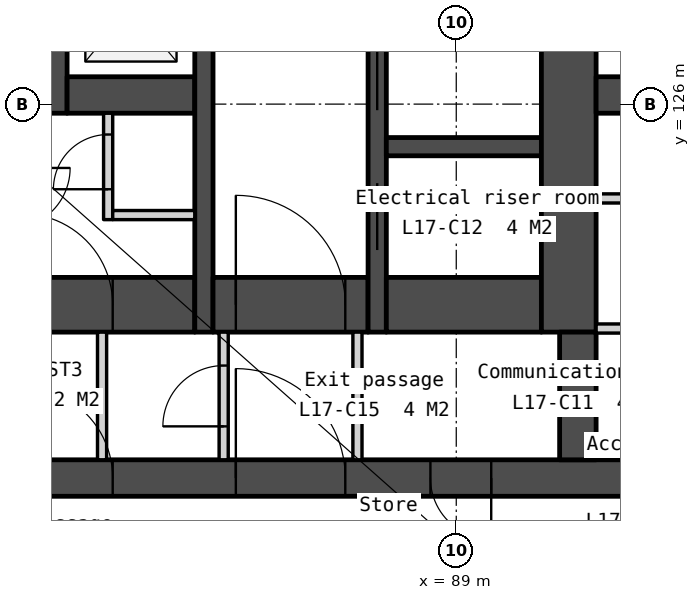
"""IFC4 building model, lengths in metres.
Left out: names, types, materials, properties, quantities, classifications, styles, units other than length and angle.
Written with IfcOpenShell. Run it as: python <this file> out.ifc"""

import sys

from ifc_helpers import new_model, si_unit, direction, frame, frame_2d, origin, place, context, subcontext, project, spatial, polyline, rectangle, outline, extrude, element, fill, save


model = new_model("IFC4")
c1 = context("Model", 3, precision=1e-05, world=origin(), true_north=direction((0.0, 1.0)))
c2 = subcontext(c1, "Body", "Model", "MODEL_VIEW")
j1 = project(units=[si_unit("LENGTHUNIT", "METRE"), si_unit("PLANEANGLEUNIT", "RADIAN")], contexts=[c1])
p1 = place(None, origin())
s1 = spatial("IfcSite", under=j1, at=p1, CompositionType="ELEMENT")
p2 = place(p1, origin())
s2 = spatial("IfcBuilding", under=s1, at=p2, CompositionType="ELEMENT")
p3 = place(p2, frame((0.0, 0.0, 73.5)))
s3 = spatial("IfcBuildingStorey", under=s2, at=p3, CompositionType="ELEMENT", Elevation=73.5)
p4 = place(p3, frame((66.0, 119.85, 0.0), z_axis=(0.0, 0.0, 1.0), x_axis=(1.0, 0.0, 0.0)))
e1 = element("IfcWall", 1, at=p4, inside=s3, PredefinedType="SOLIDWALL", context=c2, shape_type="SweptSolid", body=[
    extrude(rectangle(XDim=28.0, YDim=0.6, at=frame_2d((14.0, 0.0))), origin(), (0.0, 0.0, 1.0), 3.25),
])
p5 = place(p4, frame((6.825, 0.0, 0.0)))
e2 = element("IfcOpeningElement", 2, at=p5, cuts=e1, PredefinedType="OPENING", context=c2, shape_type="SweptSolid", body=[
    extrude(rectangle(XDim=1.8, YDim=2.1, at=frame_2d((0.9, 1.05))), frame((0.0, 0.31, 0.0), z_axis=(0.0, -1.0, 0.0), x_axis=(1.0, 0.0, 0.0)), (0.0, 0.0, 1.0), 0.62),
])
p6 = place(p4, frame((15.85, 0.0, 0.0)))
e3 = element("IfcOpeningElement", 3, at=p6, cuts=e1, PredefinedType="OPENING", context=c2, shape_type="SweptSolid", body=[
    extrude(rectangle(XDim=1.5, YDim=2.1, at=frame_2d((0.75, 1.05))), frame((0.0, 0.31, 0.0), z_axis=(0.0, -1.0, 0.0), x_axis=(1.0, 0.0, 0.0)), (0.0, 0.0, 1.0), 0.62),
])
p7 = place(p4, frame((19.375, 0.0, 0.0)))
e4 = element("IfcOpeningElement", 4, at=p7, cuts=e1, PredefinedType="OPENING", context=c2, shape_type="SweptSolid", body=[
    extrude(rectangle(XDim=1.8, YDim=2.1, at=frame_2d((0.9, 1.05))), frame((0.0, 0.31, 0.0), z_axis=(0.0, -1.0, 0.0), x_axis=(1.0, 0.0, 0.0)), (0.0, 0.0, 1.0), 0.62),
])
p8 = place(p4, frame((4.425, 0.0, 0.0)))
e5 = element("IfcOpeningElement", 5, at=p8, cuts=e1, PredefinedType="OPENING", context=c2, shape_type="SweptSolid", body=[
    extrude(rectangle(XDim=1.0, YDim=2.1, at=frame_2d((0.5, 1.05))), frame((0.0, 0.31, 0.0), z_axis=(0.0, -1.0, 0.0), x_axis=(1.0, 0.0, 0.0)), (0.0, 0.0, 1.0), 0.62),
])
p9 = place(p4, frame((9.783, 0.0, 0.0)))
e6 = element("IfcOpeningElement", 6, at=p9, cuts=e1, PredefinedType="OPENING", context=c2, shape_type="SweptSolid", body=[
    extrude(rectangle(XDim=1.0, YDim=2.1, at=frame_2d((0.5, 1.05))), frame((0.0, 0.31, 0.0), z_axis=(0.0, -1.0, 0.0), x_axis=(1.0, 0.0, 0.0)), (0.0, 0.0, 1.0), 0.62),
])
p10 = place(p4, frame((11.525, 0.0, 0.0)))
e7 = element("IfcOpeningElement", 7, at=p10, cuts=e1, PredefinedType="OPENING", context=c2, shape_type="SweptSolid", body=[
    extrude(rectangle(XDim=1.0, YDim=2.1, at=frame_2d((0.5, 1.05))), frame((0.0, 0.31, 0.0), z_axis=(0.0, -1.0, 0.0), x_axis=(1.0, 0.0, 0.0)), (0.0, 0.0, 1.0), 0.62),
])
p11 = place(p4, frame((13.658, 0.0, 0.0)))
e8 = element("IfcOpeningElement", 8, at=p11, cuts=e1, PredefinedType="OPENING", context=c2, shape_type="SweptSolid", body=[
    extrude(rectangle(XDim=1.0, YDim=2.1, at=frame_2d((0.5, 1.05))), frame((0.0, 0.31, 0.0), z_axis=(0.0, -1.0, 0.0), x_axis=(1.0, 0.0, 0.0)), (0.0, 0.0, 1.0), 0.62),
])
p12 = place(p4, frame((22.575, 0.0, 0.0)))
e9 = element("IfcOpeningElement", 9, at=p12, cuts=e1, PredefinedType="OPENING", context=c2, shape_type="SweptSolid", body=[
    extrude(rectangle(XDim=1.0, YDim=2.1, at=frame_2d((0.5, 1.05))), frame((0.0, 0.31, 0.0), z_axis=(0.0, -1.0, 0.0), x_axis=(1.0, 0.0, 0.0)), (0.0, 0.0, 1.0), 0.62),
])
p13 = place(p3, frame((81.8, 122.7, 0.0), z_axis=(0.0, 0.0, 1.0), x_axis=(1.0, 0.0, 0.0)))
e10 = element("IfcWall", 10, at=p13, inside=s3, PredefinedType="SOLIDWALL", context=c2, shape_type="SweptSolid", body=[
    extrude(rectangle(XDim=2.9, YDim=0.9, at=frame_2d((1.45, 0.0))), origin(), (0.0, 0.0, 1.0), 3.25),
])
p14 = place(p13, frame((0.05, 0.0, 0.0)))
e11 = element("IfcOpeningElement", 11, at=p14, cuts=e10, PredefinedType="OPENING", context=c2, shape_type="SweptSolid", body=[
    extrude(rectangle(XDim=1.5, YDim=2.1, at=frame_2d((0.75, 1.05))), frame((0.0, 0.46, 0.0), z_axis=(0.0, -1.0, 0.0), x_axis=(1.0, 0.0, 0.0)), (0.0, 0.0, 1.0), 0.92),
])
p15 = place(p3, frame((82.45, 133.95, 0.0), z_axis=(0.0, 0.0, 1.0), x_axis=(0.0, -1.0, 0.0)))
e12 = element("IfcWall", 12, at=p15, inside=s3, PredefinedType="SOLIDWALL", context=c2, shape_type="SweptSolid", body=[
    extrude(rectangle(XDim=8.1, YDim=0.3, at=frame_2d((4.05, 0.0))), origin(), (0.0, 0.0, 1.0), 3.25),
])
p16 = place(p15, frame((0.6, 0.0, 0.0)))
e13 = element("IfcOpeningElement", 13, at=p16, cuts=e12, PredefinedType="OPENING", context=c2, shape_type="SweptSolid", body=[
    extrude(rectangle(XDim=1.1, YDim=2.1, at=frame_2d((0.55, 1.05))), frame((0.0, 0.16, 0.0), z_axis=(0.0, -1.0, 0.0), x_axis=(1.0, 0.0, 0.0)), (0.0, 0.0, 1.0), 0.32),
])
p17 = place(p15, frame((3.2, 0.0, 0.0)))
e14 = element("IfcOpeningElement", 14, at=p17, cuts=e12, PredefinedType="OPENING", context=c2, shape_type="SweptSolid", body=[
    extrude(rectangle(XDim=1.1, YDim=2.1, at=frame_2d((0.55, 1.05))), frame((0.0, 0.16, 0.0), z_axis=(0.0, -1.0, 0.0), x_axis=(1.0, 0.0, 0.0)), (0.0, 0.0, 1.0), 0.32),
])
p18 = place(p15, frame((5.8, 0.0, 0.0)))
e15 = element("IfcOpeningElement", 15, at=p18, cuts=e12, PredefinedType="OPENING", context=c2, shape_type="SweptSolid", body=[
    extrude(rectangle(XDim=1.1, YDim=2.1, at=frame_2d((0.55, 1.05))), frame((0.0, 0.16, 0.0), z_axis=(0.0, -1.0, 0.0), x_axis=(1.0, 0.0, 0.0)), (0.0, 0.0, 1.0), 0.32),
])
p19 = place(p3, frame((82.6, 126.15, 0.0), z_axis=(0.0, 0.0, 1.0), x_axis=(1.0, 0.0, 0.0)))
e16 = element("IfcWall", 16, at=p19, inside=s3, PredefinedType="SOLIDWALL", context=c2, shape_type="SweptSolid", body=[
    extrude(rectangle(XDim=2.1, YDim=0.6, at=frame_2d((1.05, 0.0))), origin(), (0.0, 0.0, 1.0), 3.25),
])
p20 = place(p3, frame((83.175, 122.25, 0.0), z_axis=(0.0, 0.0, 1.0), x_axis=(0.0, -1.0, 0.0)))
e17 = element("IfcWall", 17, at=p20, inside=s3, PredefinedType="PARTITIONING", context=c2, shape_type="SweptSolid", body=[
    extrude(rectangle(XDim=2.1, YDim=0.15, at=frame_2d((1.05, 0.0))), origin(), (0.0, 0.0, 1.0), 3.25),
])
p21 = place(p3, frame((83.275, 125.85, 0.0), z_axis=(0.0, 0.0, 1.0), x_axis=(0.0, -1.0, 0.0)))
e18 = element("IfcWall", 18, at=p21, inside=s3, PredefinedType="PARTITIONING", context=c2, shape_type="SweptSolid", body=[
    extrude(rectangle(XDim=1.75, YDim=0.15, at=frame_2d((0.875, 0.0))), origin(), (0.0, 0.0, 1.0), 3.25),
])
p22 = place(p21, frame((0.35, 0.0, 0.0)))
e19 = element("IfcOpeningElement", 19, at=p22, cuts=e18, PredefinedType="OPENING", context=c2, shape_type="SweptSolid", body=[
    extrude(rectangle(XDim=0.9, YDim=2.1, at=frame_2d((0.45, 1.05))), frame((0.0, 0.085, 0.0), z_axis=(0.0, -1.0, 0.0), x_axis=(1.0, 0.0, 0.0)), (0.0, 0.0, 1.0), 0.17),
])
p23 = place(p3, frame((83.35, 124.175, 0.0), z_axis=(0.0, 0.0, 1.0), x_axis=(1.0, 0.0, 0.0)))
e20 = element("IfcWall", 20, at=p23, inside=s3, PredefinedType="PARTITIONING", context=c2, shape_type="SweptSolid", body=[
    extrude(rectangle(XDim=1.35, YDim=0.15, at=frame_2d((0.675, 0.0))), origin(), (0.0, 0.0, 1.0), 3.25),
])
p24 = place(p3, frame((84.85, 133.95, 0.0), z_axis=(0.0, 0.0, 1.0), x_axis=(0.0, -1.0, 0.0)))
e21 = element("IfcWall", 21, at=p24, inside=s3, PredefinedType="SOLIDWALL", context=c2, shape_type="SweptSolid", body=[
    extrude(rectangle(XDim=11.7, YDim=0.3, at=frame_2d((5.85, 0.0))), origin(), (0.0, 0.0, 1.0), 3.25),
])
p25 = place(p3, frame((85.0, 122.7, 0.0), z_axis=(0.0, 0.0, 1.0), x_axis=(1.0, 0.0, 0.0)))
e22 = element("IfcWall", 22, at=p25, inside=s3, PredefinedType="SOLIDWALL", context=c2, shape_type="SweptSolid", body=[
    extrude(rectangle(XDim=2.55, YDim=0.9, at=frame_2d((1.275, 0.0))), origin(), (0.0, 0.0, 1.0), 3.25),
])
p26 = place(p25, frame((0.375, 0.0, 0.0)))
e23 = element("IfcOpeningElement", 23, at=p26, cuts=e22, PredefinedType="OPENING", context=c2, shape_type="SweptSolid", body=[
    extrude(rectangle(XDim=1.8, YDim=2.1, at=frame_2d((0.9, 1.05))), frame((0.0, 0.46, 0.0), z_axis=(0.0, -1.0, 0.0), x_axis=(1.0, 0.0, 0.0)), (0.0, 0.0, 1.0), 0.92),
])
p27 = place(p3, frame((85.175, 122.25, 0.0), z_axis=(0.0, 0.0, 1.0), x_axis=(0.0, -1.0, 0.0)))
e24 = element("IfcWall", 24, at=p27, inside=s3, PredefinedType="PARTITIONING", context=c2, shape_type="SweptSolid", body=[
    extrude(rectangle(XDim=2.1, YDim=0.15, at=frame_2d((1.05, 0.0))), origin(), (0.0, 0.0, 1.0), 3.25),
])
p28 = place(p27, frame((0.55, 0.0, 0.0)))
e25 = element("IfcOpeningElement", 25, at=p28, cuts=e24, PredefinedType="OPENING", context=c2, shape_type="SweptSolid", body=[
    extrude(rectangle(XDim=1.0, YDim=2.1, at=frame_2d((0.5, 1.05))), frame((0.0, 0.085, 0.0), z_axis=(0.0, -1.0, 0.0), x_axis=(1.0, 0.0, 0.0)), (0.0, 0.0, 1.0), 0.17),
])
p29 = place(p3, frame((87.375, 122.25, 0.0), z_axis=(0.0, 0.0, 1.0), x_axis=(0.0, -1.0, 0.0)))
e26 = element("IfcWall", 26, at=p29, inside=s3, PredefinedType="PARTITIONING", context=c2, shape_type="SweptSolid", body=[
    extrude(rectangle(XDim=2.1, YDim=0.15, at=frame_2d((1.05, 0.0))), origin(), (0.0, 0.0, 1.0), 3.25),
])
p30 = place(p3, frame((87.7, 133.95, 0.0), z_axis=(0.0, 0.0, 1.0), x_axis=(0.0, -1.0, 0.0)))
e27 = element("IfcWall", 27, at=p30, inside=s3, PredefinedType="SOLIDWALL", context=c2, shape_type="SweptSolid", body=[
    extrude(rectangle(XDim=11.7, YDim=0.3, at=frame_2d((5.85, 0.0))), origin(), (0.0, 0.0, 1.0), 3.25),
])
p31 = place(p30, frame((6.95, 0.0, 0.0)))
e28 = element("IfcOpeningElement", 28, at=p31, cuts=e27, PredefinedType="OPENING", context=c2, shape_type="SweptSolid", body=[
    extrude(rectangle(XDim=1.1, YDim=2.1, at=frame_2d((0.55, 1.05))), frame((0.0, 0.16, 0.0), z_axis=(0.0, -1.0, 0.0), x_axis=(1.0, 0.0, 0.0)), (0.0, 0.0, 1.0), 0.32),
])
p32 = place(p30, frame((5.1, 0.0, 0.0)))
e29 = element("IfcOpeningElement", 29, at=p32, cuts=e27, PredefinedType="OPENING", context=c2, shape_type="SweptSolid", body=[
    extrude(rectangle(XDim=1.0, YDim=2.1, at=frame_2d((0.5, 1.05))), frame((0.0, 0.16, 0.0), z_axis=(0.0, -1.0, 0.0), x_axis=(1.0, 0.0, 0.0)), (0.0, 0.0, 1.0), 0.32),
])
p33 = place(p30, frame((9.25, 0.0, 0.0)))
e30 = element("IfcOpeningElement", 30, at=p33, cuts=e27, PredefinedType="OPENING", context=c2, shape_type="SweptSolid", body=[
    extrude(rectangle(XDim=1.1, YDim=2.1, at=frame_2d((0.55, 1.05))), frame((0.0, 0.16, 0.0), z_axis=(0.0, -1.0, 0.0), x_axis=(1.0, 0.0, 0.0)), (0.0, 0.0, 1.0), 0.32),
])
p34 = place(p3, frame((87.85, 125.3, 0.0), z_axis=(0.0, 0.0, 1.0), x_axis=(1.0, 0.0, 0.0)))
e31 = element("IfcWall", 31, at=p34, inside=s3, PredefinedType="SOLIDWALL", context=c2, shape_type="SweptSolid", body=[
    extrude(rectangle(XDim=2.55, YDim=0.3, at=frame_2d((1.275, 0.0))), origin(), (0.0, 0.0, 1.0), 3.25),
])
p35 = place(p3, frame((87.85, 122.7, 0.0), z_axis=(0.0, 0.0, 1.0), x_axis=(1.0, 0.0, 0.0)))
e32 = element("IfcWall", 32, at=p35, inside=s3, PredefinedType="SOLIDWALL", context=c2, shape_type="SweptSolid", body=[
    extrude(rectangle(XDim=2.55, YDim=0.9, at=frame_2d((1.275, 0.0))), origin(), (0.0, 0.0, 1.0), 3.25),
])
p36 = place(p3, frame((90.85, 133.95, 0.0), z_axis=(0.0, 0.0, 1.0), x_axis=(0.0, -1.0, 0.0)))
e33 = element("IfcWall", 33, at=p36, inside=s3, PredefinedType="SOLIDWALL", context=c2, shape_type="SweptSolid", body=[
    extrude(rectangle(XDim=11.7, YDim=0.9, at=frame_2d((5.85, 0.0))), origin(), (0.0, 0.0, 1.0), 3.25),
])
p37 = place(p3, frame((91.0, 122.25, 0.0), z_axis=(0.0, 0.0, 1.0), x_axis=(0.0, -1.0, 0.0)))
e34 = element("IfcWall", 34, at=p37, inside=s3, PredefinedType="SOLIDWALL", context=c2, shape_type="SweptSolid", body=[
    extrude(rectangle(XDim=2.1, YDim=0.6, at=frame_2d((1.05, 0.0))), origin(), (0.0, 0.0, 1.0), 3.25),
])
p38 = place(p3, frame((91.3, 126.15, 0.0), z_axis=(0.0, 0.0, 1.0), x_axis=(1.0, 0.0, 0.0)))
e35 = element("IfcWall", 35, at=p38, inside=s3, PredefinedType="SOLIDWALL", context=c2, shape_type="SweptSolid", body=[
    extrude(rectangle(XDim=2.1, YDim=0.6, at=frame_2d((1.05, 0.0))), origin(), (0.0, 0.0, 1.0), 3.25),
])
for number, where, z_axis, x_axis in (
    (36, (91.3, 124.449, 0.0), (0.0, 0.0, 1.0), (1.0, 0.0, 0.0)),
    (37, (91.3, 122.309, 0.0), (0.0, 0.0, 1.0), (1.0, 0.0, 0.0)),
):
    element("IfcWall", number, at=place(p3, frame(where, z_axis=z_axis, x_axis=x_axis)), inside=s3, PredefinedType="PARTITIONING", context=c2, shape_type="SweptSolid", body=[
        extrude(rectangle(XDim=2.1, YDim=0.15, at=frame_2d((1.05, 0.0))), origin(), (0.0, 0.0, 1.0), 3.25),
    ])
p39 = place(p3, frame((83.105, 90.599, -0.15), z_axis=(0.0, 0.0, 1.0), x_axis=(0.499999201451, 0.866025864826, 0.0)))
e38 = element("IfcWall", 38, at=p39, inside=s3, PredefinedType="SOLIDWALL", context=c2, shape_type="SweptSolid", body=[
    extrude(outline(polyline([(44.8, 0.0), (44.8, 3.4), (0.0, 3.4), (0.0, 0.0), (44.8, 0.0)])), frame((0.0, 0.225, 0.0), z_axis=(0.0, -1.0, 0.0), x_axis=(1.0, 0.0, 0.0)), (0.0, 0.0, 1.0), 0.45),
])
p40 = place(p39, frame((3.03, 0.0, 1.05)))
e39 = element("IfcOpeningElement", 39, at=p40, cuts=e38, PredefinedType="OPENING", context=c2, shape_type="SweptSolid", body=[
    extrude(rectangle(XDim=1.2, YDim=1.5, at=frame_2d((0.6, 0.75))), frame((0.0, 0.235, 0.0), z_axis=(0.0, -1.0, 0.0), x_axis=(1.0, 0.0, 0.0)), (0.0, 0.0, 1.0), 0.47),
])
p41 = place(p39, frame((4.73, 0.0, 1.05)))
e40 = element("IfcOpeningElement", 40, at=p41, cuts=e38, PredefinedType="OPENING", context=c2, shape_type="SweptSolid", body=[
    extrude(rectangle(XDim=1.2, YDim=1.5, at=frame_2d((0.6, 0.75))), frame((0.0, 0.235, 0.0), z_axis=(0.0, -1.0, 0.0), x_axis=(1.0, 0.0, 0.0)), (0.0, 0.0, 1.0), 0.47),
])
p42 = place(p39, frame((11.99, 0.0, 1.05)))
e41 = element("IfcOpeningElement", 41, at=p42, cuts=e38, PredefinedType="OPENING", context=c2, shape_type="SweptSolid", body=[
    extrude(rectangle(XDim=1.2, YDim=1.5, at=frame_2d((0.6, 0.75))), frame((0.0, 0.235, 0.0), z_axis=(0.0, -1.0, 0.0), x_axis=(1.0, 0.0, 0.0)), (0.0, 0.0, 1.0), 0.47),
])
p43 = place(p39, frame((13.69, 0.0, 1.05)))
e42 = element("IfcOpeningElement", 42, at=p43, cuts=e38, PredefinedType="OPENING", context=c2, shape_type="SweptSolid", body=[
    extrude(rectangle(XDim=1.2, YDim=1.5, at=frame_2d((0.6, 0.75))), frame((0.0, 0.235, 0.0), z_axis=(0.0, -1.0, 0.0), x_axis=(1.0, 0.0, 0.0)), (0.0, 0.0, 1.0), 0.47),
])
p44 = place(p39, frame((20.95, 0.0, 1.05)))
e43 = element("IfcOpeningElement", 43, at=p44, cuts=e38, PredefinedType="OPENING", context=c2, shape_type="SweptSolid", body=[
    extrude(rectangle(XDim=1.2, YDim=1.5, at=frame_2d((0.6, 0.75))), frame((0.0, 0.235, 0.0), z_axis=(0.0, -1.0, 0.0), x_axis=(1.0, 0.0, 0.0)), (0.0, 0.0, 1.0), 0.47),
])
p45 = place(p39, frame((22.65, 0.0, 1.05)))
e44 = element("IfcOpeningElement", 44, at=p45, cuts=e38, PredefinedType="OPENING", context=c2, shape_type="SweptSolid", body=[
    extrude(rectangle(XDim=1.2, YDim=1.5, at=frame_2d((0.6, 0.75))), frame((0.0, 0.235, 0.0), z_axis=(0.0, -1.0, 0.0), x_axis=(1.0, 0.0, 0.0)), (0.0, 0.0, 1.0), 0.47),
])
p46 = place(p39, frame((29.91, 0.0, 1.05)))
e45 = element("IfcOpeningElement", 45, at=p46, cuts=e38, PredefinedType="OPENING", context=c2, shape_type="SweptSolid", body=[
    extrude(rectangle(XDim=1.2, YDim=1.5, at=frame_2d((0.6, 0.75))), frame((0.0, 0.235, 0.0), z_axis=(0.0, -1.0, 0.0), x_axis=(1.0, 0.0, 0.0)), (0.0, 0.0, 1.0), 0.47),
])
p47 = place(p39, frame((31.61, 0.0, 1.05)))
e46 = element("IfcOpeningElement", 46, at=p47, cuts=e38, PredefinedType="OPENING", context=c2, shape_type="SweptSolid", body=[
    extrude(rectangle(XDim=1.2, YDim=1.5, at=frame_2d((0.6, 0.75))), frame((0.0, 0.235, 0.0), z_axis=(0.0, -1.0, 0.0), x_axis=(1.0, 0.0, 0.0)), (0.0, 0.0, 1.0), 0.47),
])
p48 = place(p39, frame((38.87, 0.0, 1.05)))
e47 = element("IfcOpeningElement", 47, at=p48, cuts=e38, PredefinedType="OPENING", context=c2, shape_type="SweptSolid", body=[
    extrude(rectangle(XDim=1.2, YDim=1.5, at=frame_2d((0.6, 0.75))), frame((0.0, 0.235, 0.0), z_axis=(0.0, -1.0, 0.0), x_axis=(1.0, 0.0, 0.0)), (0.0, 0.0, 1.0), 0.47),
])
p49 = place(p39, frame((40.57, 0.0, 1.05)))
e48 = element("IfcOpeningElement", 48, at=p49, cuts=e38, PredefinedType="OPENING", context=c2, shape_type="SweptSolid", body=[
    extrude(rectangle(XDim=1.2, YDim=1.5, at=frame_2d((0.6, 0.75))), frame((0.0, 0.235, 0.0), z_axis=(0.0, -1.0, 0.0), x_axis=(1.0, 0.0, 0.0)), (0.0, 0.0, 1.0), 0.47),
])
p50 = place(p31, origin())
e49 = element("IfcDoor", 49, at=p50, inside=s3, OperationType="SLIDING_TO_LEFT", PredefinedType="DOOR", context=c2, shape_type="SweptSolid", body=[
    extrude(rectangle(XDim=1.1, YDim=2.1, at=frame_2d((0.55, 1.05))), frame((0.0, 0.025, 0.0), z_axis=(0.0, -1.0, 0.0), x_axis=(1.0, 0.0, 0.0)), (0.0, 0.0, 1.0), 0.05),
])
fill(e28, e49)
p51 = place(p26, origin())
e50 = element("IfcDoor", 50, at=p51, inside=s3, OperationType="DOUBLE_DOOR_DOUBLE_SWING", PredefinedType="DOOR", context=c2, shape_type="SweptSolid", body=[
    extrude(rectangle(XDim=1.8, YDim=2.1, at=frame_2d((0.9, 1.05))), frame((0.0, 0.025, 0.0), z_axis=(0.0, -1.0, 0.0), x_axis=(1.0, 0.0, 0.0)), (0.0, 0.0, 1.0), 0.05),
])
fill(e23, e50)
p52 = place(p14, origin())
e51 = element("IfcDoor", 51, at=p52, inside=s3, OperationType="DOUBLE_DOOR_DOUBLE_SWING", PredefinedType="DOOR", context=c2, shape_type="SweptSolid", body=[
    extrude(rectangle(XDim=1.5, YDim=2.1, at=frame_2d((0.75, 1.05))), frame((0.0, 0.025, 0.0), z_axis=(0.0, -1.0, 0.0), x_axis=(1.0, 0.0, 0.0)), (0.0, 0.0, 1.0), 0.05),
])
fill(e11, e51)
p53 = place(p6, origin())
e52 = element("IfcDoor", 52, at=p53, inside=s3, OperationType="DOUBLE_DOOR_DOUBLE_SWING", PredefinedType="DOOR", context=c2, shape_type="SweptSolid", body=[
    extrude(rectangle(XDim=1.5, YDim=2.1, at=frame_2d((0.75, 1.05))), frame((0.0, 0.025, 0.0), z_axis=(0.0, -1.0, 0.0), x_axis=(1.0, 0.0, 0.0)), (0.0, 0.0, 1.0), 0.05),
])
fill(e3, e52)
p54 = place(p7, origin())
e53 = element("IfcDoor", 53, at=p54, inside=s3, OperationType="DOUBLE_DOOR_DOUBLE_SWING", PredefinedType="DOOR", context=c2, shape_type="SweptSolid", body=[
    extrude(rectangle(XDim=1.8, YDim=2.1, at=frame_2d((0.9, 1.05))), frame((0.0, 0.025, 0.0), z_axis=(0.0, -1.0, 0.0), x_axis=(1.0, 0.0, 0.0)), (0.0, 0.0, 1.0), 0.05),
])
fill(e4, e53)
p55 = place(p22, origin())
e54 = element("IfcDoor", 54, at=p55, inside=s3, OperationType="SINGLE_SWING_RIGHT", PredefinedType="DOOR", context=c2, shape_type="SweptSolid", body=[
    extrude(rectangle(XDim=0.9, YDim=2.1, at=frame_2d((0.45, 1.05))), frame((0.0, 0.025, 0.0), z_axis=(0.0, -1.0, 0.0), x_axis=(1.0, 0.0, 0.0)), (0.0, 0.0, 1.0), 0.05),
])
fill(e19, e54)
p56 = place(p28, origin())
e55 = element("IfcDoor", 55, at=p56, inside=s3, OperationType="SINGLE_SWING_RIGHT", PredefinedType="DOOR", context=c2, shape_type="SweptSolid", body=[
    extrude(rectangle(XDim=1.0, YDim=2.1, at=frame_2d((0.5, 1.05))), frame((0.0, 0.025, 0.0), z_axis=(0.0, -1.0, 0.0), x_axis=(1.0, 0.0, 0.0)), (0.0, 0.0, 1.0), 0.05),
])
fill(e25, e55)
p57 = place(p12, origin())
e56 = element("IfcDoor", 56, at=p57, inside=s3, OperationType="SINGLE_SWING_RIGHT", PredefinedType="DOOR", context=c2, shape_type="SweptSolid", body=[
    extrude(rectangle(XDim=1.0, YDim=2.1, at=frame_2d((0.5, 1.05))), frame((0.0, 0.025, 0.0), z_axis=(0.0, -1.0, 0.0), x_axis=(1.0, 0.0, 0.0)), (0.0, 0.0, 1.0), 0.05),
])
fill(e9, e56)
p58 = place(p33, origin())
e57 = element("IfcDoor", 57, at=p58, inside=s3, OperationType="SLIDING_TO_LEFT", PredefinedType="DOOR", context=c2, shape_type="SweptSolid", body=[
    extrude(rectangle(XDim=1.1, YDim=2.1, at=frame_2d((0.55, 1.05))), frame((0.0, 0.025, 0.0), z_axis=(0.0, -1.0, 0.0), x_axis=(1.0, 0.0, 0.0)), (0.0, 0.0, 1.0), 0.05),
])
fill(e30, e57)
save(model, sys.argv[1])
